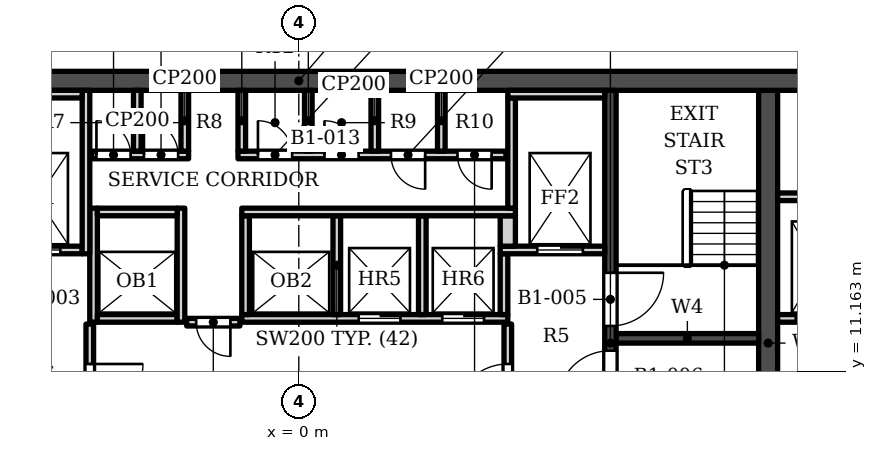
"""IFC4 building model, lengths in metres.
Left out: names, types, materials, properties, quantities, classifications, styles, units other than length and angle.
Written with IfcOpenShell. Run it as: python <this file> out.ifc"""

import sys

from ifc_helpers import new_model, si_unit, direction, frame, frame_2d, origin, place, context, subcontext, project, spatial, rectangle, extrude, element, fill, save


model = new_model("IFC4")
c1 = context("Model", 3, precision=1e-05, world=origin(), true_north=direction((0.0, 1.0)))
c2 = subcontext(c1, "Body", "Model", "MODEL_VIEW")
j1 = project(units=[si_unit("LENGTHUNIT", "METRE"), si_unit("PLANEANGLEUNIT", "RADIAN")], contexts=[c1])
p1 = place(None, origin())
s1 = spatial("IfcSite", under=j1, at=p1, CompositionType="ELEMENT")
p2 = place(p1, origin())
s2 = spatial("IfcBuilding", under=s1, at=p2, CompositionType="ELEMENT")
p3 = place(p2, frame((0.0, 0.0, -5.0)))
s3 = spatial("IfcBuildingStorey", under=s2, at=p3, CompositionType="ELEMENT", Elevation=-5.0)
p4 = place(p3, frame((-16.9, 18.802, 0.0), z_axis=(0.0, 0.0, 1.0), x_axis=(1.0, 0.0, 0.0)))
e1 = element("IfcWall", 1, at=p4, inside=s3, PredefinedType="SHEAR", context=c2, shape_type="SweptSolid", body=[
    extrude(rectangle(XDim=33.8, YDim=0.5, at=frame_2d((16.9, 0.0))), origin(), (0.0, 0.0, 1.0), 5.0),
])
p5 = place(p3, frame((12.35, 5.253, 0.0), z_axis=(0.0, 0.0, 1.0), x_axis=(0.0, 1.0, 0.0)))
e2 = element("IfcWall", 2, at=p5, inside=s3, PredefinedType="SHEAR", context=c2, shape_type="SweptSolid", body=[
    extrude(rectangle(XDim=13.3, YDim=0.5, at=frame_2d((6.65, 0.0))), origin(), (0.0, 0.0, 1.0), 5.0),
])
p6 = place(p3, frame((8.2, 5.253, 0.0), z_axis=(0.0, 0.0, 1.0), x_axis=(0.0, 1.0, 0.0)))
e3 = element("IfcWall", 3, at=p6, inside=s3, PredefinedType="SHEAR", context=c2, shape_type="SweptSolid", body=[
    extrude(rectangle(XDim=13.3, YDim=0.3, at=frame_2d((6.65, 0.0))), origin(), (0.0, 0.0, 1.0), 5.0),
])
p7 = place(p6, frame((7.1, 0.0, 0.0)))
e4 = element("IfcOpeningElement", 4, at=p7, cuts=e3, PredefinedType="OPENING", context=c2, shape_type="SweptSolid", body=[
    extrude(rectangle(XDim=1.4, YDim=2.1, at=frame_2d((0.7, 1.05))), frame((0.0, 0.16, 0.0), z_axis=(0.0, -1.0, 0.0), x_axis=(1.0, 0.0, 0.0)), (0.0, 0.0, 1.0), 0.32),
])
p8 = place(p6, frame((5.05, 0.0, 0.0)))
e5 = element("IfcOpeningElement", 5, at=p8, cuts=e3, PredefinedType="OPENING", context=c2, shape_type="SweptSolid", body=[
    extrude(rectangle(XDim=1.4, YDim=2.1, at=frame_2d((0.7, 1.05))), frame((0.0, 0.16, 0.0), z_axis=(0.0, -1.0, 0.0), x_axis=(1.0, 0.0, 0.0)), (0.0, 0.0, 1.0), 0.32),
])
p9 = place(p3, frame((8.35, 12.028, 0.0), z_axis=(0.0, 0.0, 1.0), x_axis=(1.0, 0.0, 0.0)))
e6 = element("IfcWall", 6, at=p9, inside=s3, PredefinedType="SHEAR", context=c2, shape_type="SweptSolid", body=[
    extrude(rectangle(XDim=3.75, YDim=0.25, at=frame_2d((1.875, 0.0))), origin(), (0.0, 0.0, 1.0), 5.0),
])
p10 = place(p3, frame((-5.5, 9.103, 0.0), z_axis=(0.0, 0.0, 1.0), x_axis=(0.0, 1.0, 0.0)))
e7 = element("IfcWall", 7, at=p10, inside=s3, PredefinedType="SOLIDWALL", context=c2, shape_type="SweptSolid", body=[
    extrude(rectangle(XDim=3.3, YDim=0.2, at=frame_2d((1.65, 0.0))), origin(), (0.0, 0.0, 1.0), 4.45),
])
p11 = place(p10, frame((0.85, 0.0, 0.0)))
e8 = element("IfcOpeningElement", 8, at=p11, cuts=e7, PredefinedType="OPENING", context=c2, shape_type="SweptSolid", body=[
    extrude(rectangle(XDim=1.4, YDim=2.1, at=frame_2d((0.7, 1.05))), frame((0.0, 0.11, 0.0), z_axis=(0.0, -1.0, 0.0), x_axis=(1.0, 0.0, 0.0)), (0.0, 0.0, 1.0), 0.22),
])
p12 = place(p3, frame((5.5, 9.103, 0.0), z_axis=(0.0, 0.0, 1.0), x_axis=(0.0, 1.0, 0.0)))
e9 = element("IfcWall", 9, at=p12, inside=s3, PredefinedType="SOLIDWALL", context=c2, shape_type="SweptSolid", body=[
    extrude(rectangle(XDim=3.3, YDim=0.2, at=frame_2d((1.65, 0.0))), origin(), (0.0, 0.0, 1.0), 4.45),
])
p13 = place(p12, frame((0.85, 0.0, 0.0)))
e10 = element("IfcOpeningElement", 10, at=p13, cuts=e9, PredefinedType="OPENING", context=c2, shape_type="SweptSolid", body=[
    extrude(rectangle(XDim=1.4, YDim=2.1, at=frame_2d((0.7, 1.05))), frame((0.0, 0.11, 0.0), z_axis=(0.0, -1.0, 0.0), x_axis=(1.0, 0.0, 0.0)), (0.0, 0.0, 1.0), 0.22),
])
p14 = place(p3, frame((-2.95, 12.453, 0.0), z_axis=(0.0, 0.0, 1.0), x_axis=(1.0, 0.0, 0.0)))
e11 = element("IfcWall", 11, at=p14, inside=s3, PredefinedType="SOLIDWALL", context=c2, shape_type="SweptSolid", body=[
    extrude(rectangle(XDim=1.4, YDim=0.2, at=frame_2d((0.7, 0.0))), origin(), (0.0, 0.0, 1.0), 4.45),
])
p15 = place(p14, frame((0.25, 0.0, 0.0)))
e12 = element("IfcOpeningElement", 12, at=p15, cuts=e11, PredefinedType="OPENING", context=c2, shape_type="SweptSolid", body=[
    extrude(rectangle(XDim=0.9, YDim=2.1, at=frame_2d((0.45, 1.05))), frame((0.0, 0.11, 0.0), z_axis=(0.0, -1.0, 0.0), x_axis=(1.0, 0.0, 0.0)), (0.0, 0.0, 1.0), 0.22),
])
p16 = place(p3, frame((-5.4, 12.453, 0.0), z_axis=(0.0, 0.0, 1.0), x_axis=(0.0, 1.0, 0.0)))
e13 = element("IfcWall", 13, at=p16, inside=s3, PredefinedType="SOLIDWALL", context=c2, shape_type="SweptSolid", body=[
    extrude(rectangle(XDim=3.0, YDim=0.2, at=frame_2d((1.5, 0.0))), origin(), (0.0, 0.0, 1.0), 4.45),
])
p17 = place(p3, frame((-5.3, 12.552, 0.0), z_axis=(0.0, 0.0, 1.0), x_axis=(1.0, 0.0, 0.0)))
e14 = element("IfcWall", 14, at=p17, inside=s3, PredefinedType="SOLIDWALL", context=c2, shape_type="SweptSolid", body=[
    extrude(rectangle(XDim=2.1, YDim=0.2, at=frame_2d((1.05, 0.0))), origin(), (0.0, 0.0, 1.0), 4.45),
])
p18 = place(p3, frame((-3.1, 12.453, 0.0), z_axis=(0.0, 0.0, 1.0), x_axis=(0.0, 1.0, 0.0)))
e15 = element("IfcWall", 15, at=p18, inside=s3, PredefinedType="SOLIDWALL", context=c2, shape_type="SweptSolid", body=[
    extrude(rectangle(XDim=3.0, YDim=0.2, at=frame_2d((1.5, 0.0))), origin(), (0.0, 0.0, 1.0), 4.45),
])
p19 = place(p3, frame((-1.5, 12.552, 0.0), z_axis=(0.0, 0.0, 1.0), x_axis=(1.0, 0.0, 0.0)))
e16 = element("IfcWall", 16, at=p19, inside=s3, PredefinedType="SOLIDWALL", context=c2, shape_type="SweptSolid", body=[
    extrude(rectangle(XDim=7.0, YDim=0.2, at=frame_2d((3.5, 0.0))), origin(), (0.0, 0.0, 1.0), 4.45),
])
p20 = place(p19, frame((3.075, 0.0, 0.0)))
e17 = element("IfcOpeningElement", 17, at=p20, cuts=e16, PredefinedType="OPENING", context=c2, shape_type="SweptSolid", body=[
    extrude(rectangle(XDim=1.1, YDim=2.1, at=frame_2d((0.55, 1.05))), frame((0.0, 0.11, 0.0), z_axis=(0.0, -1.0, 0.0), x_axis=(1.0, 0.0, 0.0)), (0.0, 0.0, 1.0), 0.22),
])
p21 = place(p19, frame((5.275, 0.0, 0.0)))
e18 = element("IfcOpeningElement", 18, at=p21, cuts=e16, PredefinedType="OPENING", context=c2, shape_type="SweptSolid", body=[
    extrude(rectangle(XDim=1.1, YDim=2.1, at=frame_2d((0.55, 1.05))), frame((0.0, 0.11, 0.0), z_axis=(0.0, -1.0, 0.0), x_axis=(1.0, 0.0, 0.0)), (0.0, 0.0, 1.0), 0.22),
])
p22 = place(p3, frame((12.6, 12.552, 0.0), z_axis=(0.0, 0.0, 1.0), x_axis=(1.0, 0.0, 0.0)))
e19 = element("IfcWall", 19, at=p22, inside=s3, PredefinedType="SOLIDWALL", context=c2, shape_type="SweptSolid", body=[
    extrude(rectangle(XDim=4.3, YDim=0.2, at=frame_2d((2.15, 0.0))), origin(), (0.0, 0.0, 1.0), 4.45),
])
p23 = place(p22, frame((0.475, 0.0, 0.0)))
e20 = element("IfcOpeningElement", 20, at=p23, cuts=e19, PredefinedType="OPENING", context=c2, shape_type="SweptSolid", body=[
    extrude(rectangle(XDim=1.2, YDim=2.1, at=frame_2d((0.6, 1.05))), frame((0.0, 0.11, 0.0), z_axis=(0.0, -1.0, 0.0), x_axis=(1.0, 0.0, 0.0)), (0.0, 0.0, 1.0), 0.22),
])
p24 = place(p22, frame((2.625, 0.0, 0.0)))
e21 = element("IfcOpeningElement", 21, at=p24, cuts=e19, PredefinedType="OPENING", context=c2, shape_type="SweptSolid", body=[
    extrude(rectangle(XDim=1.4, YDim=2.1, at=frame_2d((0.7, 1.05))), frame((0.0, 0.11, 0.0), z_axis=(0.0, -1.0, 0.0), x_axis=(1.0, 0.0, 0.0)), (0.0, 0.0, 1.0), 0.22),
])
for number, where, z_axis, x_axis in (
    (22, (-1.4, 12.653, 0.0), (0.0, 0.0, 1.0), (0.0, 1.0, 0.0)),
    (23, (1.0, 12.653, 0.0), (0.0, 0.0, 1.0), (0.0, 1.0, 0.0)),
    (24, (3.25, 12.653, 0.0), (0.0, 0.0, 1.0), (0.0, 1.0, 0.0)),
):
    element("IfcWall", number, at=place(p3, frame(where, z_axis=z_axis, x_axis=x_axis)), inside=s3, PredefinedType="SOLIDWALL", context=c2, shape_type="SweptSolid", body=[
        extrude(rectangle(XDim=2.6, YDim=0.2, at=frame_2d((1.3, 0.0))), origin(), (0.0, 0.0, 1.0), 4.45),
    ])
p25 = place(p3, frame((5.4, 12.653, 0.0), z_axis=(0.0, 0.0, 1.0), x_axis=(0.0, 1.0, 0.0)))
e25 = element("IfcWall", 25, at=p25, inside=s3, PredefinedType="SOLIDWALL", context=c2, shape_type="SweptSolid", body=[
    extrude(rectangle(XDim=1.6, YDim=0.2, at=frame_2d((0.8, 0.0))), origin(), (0.0, 0.0, 1.0), 4.45),
])
p26 = place(p3, frame((-8.05, 14.353, 0.0), z_axis=(0.0, 0.0, 1.0), x_axis=(1.0, 0.0, 0.0)))
e26 = element("IfcWall", 26, at=p26, inside=s3, PredefinedType="SOLIDWALL", context=c2, shape_type="SweptSolid", body=[
    extrude(rectangle(XDim=2.35, YDim=0.2, at=frame_2d((1.175, 0.0))), origin(), (0.0, 0.0, 1.0), 4.45),
])
p27 = place(p26, frame((0.575, 0.0, 0.0)))
e27 = element("IfcOpeningElement", 27, at=p27, cuts=e26, PredefinedType="OPENING", context=c2, shape_type="SweptSolid", body=[
    extrude(rectangle(XDim=1.2, YDim=2.1, at=frame_2d((0.6, 1.05))), frame((0.0, 0.11, 0.0), z_axis=(0.0, -1.0, 0.0), x_axis=(1.0, 0.0, 0.0)), (0.0, 0.0, 1.0), 0.22),
])
p28 = place(p3, frame((-5.6, 14.253, 0.0), z_axis=(0.0, 0.0, 1.0), x_axis=(0.0, 1.0, 0.0)))
e28 = element("IfcWall", 28, at=p28, inside=s3, PredefinedType="SOLIDWALL", context=c2, shape_type="SweptSolid", body=[
    extrude(rectangle(XDim=4.3, YDim=0.2, at=frame_2d((2.15, 0.0))), origin(), (0.0, 0.0, 1.0), 4.45),
])
p29 = place(p3, frame((5.3, 14.353, 0.0), z_axis=(0.0, 0.0, 1.0), x_axis=(1.0, 0.0, 0.0)))
e29 = element("IfcWall", 29, at=p29, inside=s3, PredefinedType="SOLIDWALL", context=c2, shape_type="SweptSolid", body=[
    extrude(rectangle(XDim=2.75, YDim=0.2, at=frame_2d((1.375, 0.0))), origin(), (0.0, 0.0, 1.0), 4.45),
])
p30 = place(p29, frame((0.975, 0.0, 0.0)))
e30 = element("IfcOpeningElement", 30, at=p30, cuts=e29, PredefinedType="OPENING", context=c2, shape_type="SweptSolid", body=[
    extrude(rectangle(XDim=1.2, YDim=2.1, at=frame_2d((0.6, 1.05))), frame((0.0, 0.11, 0.0), z_axis=(0.0, -1.0, 0.0), x_axis=(1.0, 0.0, 0.0)), (0.0, 0.0, 1.0), 0.22),
])
p31 = place(p3, frame((5.5, 14.453, 0.0), z_axis=(0.0, 0.0, 1.0), x_axis=(0.0, 1.0, 0.0)))
e31 = element("IfcWall", 31, at=p31, inside=s3, PredefinedType="SOLIDWALL", context=c2, shape_type="SweptSolid", body=[
    extrude(rectangle(XDim=0.8, YDim=0.4, at=frame_2d((0.4, 0.0))), origin(), (0.0, 0.0, 1.0), 4.45),
])
p32 = place(p3, frame((-5.3, 15.353, 0.0), z_axis=(0.0, 0.0, 1.0), x_axis=(1.0, 0.0, 0.0)))
e32 = element("IfcWall", 32, at=p32, inside=s3, PredefinedType="SOLIDWALL", context=c2, shape_type="SweptSolid", body=[
    extrude(rectangle(XDim=2.1, YDim=0.2, at=frame_2d((1.05, 0.0))), origin(), (0.0, 0.0, 1.0), 4.45),
])
p33 = place(p3, frame((-1.5, 15.353, 0.0), z_axis=(0.0, 0.0, 1.0), x_axis=(1.0, 0.0, 0.0)))
e33 = element("IfcWall", 33, at=p33, inside=s3, PredefinedType="SOLIDWALL", context=c2, shape_type="SweptSolid", body=[
    extrude(rectangle(XDim=7.2, YDim=0.2, at=frame_2d((3.6, 0.0))), origin(), (0.0, 0.0, 1.0), 4.45),
])
p34 = place(p3, frame((5.6, 15.453, 0.0), z_axis=(0.0, 0.0, 1.0), x_axis=(0.0, 1.0, 0.0)))
e34 = element("IfcWall", 34, at=p34, inside=s3, PredefinedType="SOLIDWALL", context=c2, shape_type="SweptSolid", body=[
    extrude(rectangle(XDim=2.9, YDim=0.2, at=frame_2d((1.45, 0.0))), origin(), (0.0, 0.0, 1.0), 4.45),
])
p35 = place(p3, frame((12.6, 15.753, 0.0), z_axis=(0.0, 0.0, 1.0), x_axis=(1.0, 0.0, 0.0)))
e35 = element("IfcWall", 35, at=p35, inside=s3, PredefinedType="SOLIDWALL", context=c2, shape_type="SweptSolid", body=[
    extrude(rectangle(XDim=4.3, YDim=0.2, at=frame_2d((2.15, 0.0))), origin(), (0.0, 0.0, 1.0), 4.45),
])
p36 = place(p3, frame((-5.45, 16.853, 0.0), z_axis=(0.0, 0.0, 1.0), x_axis=(1.0, 0.0, 0.0)))
e36 = element("IfcWall", 36, at=p36, inside=s3, PredefinedType="SOLIDWALL", context=c2, shape_type="SweptSolid", body=[
    extrude(rectangle(XDim=2.55, YDim=0.2, at=frame_2d((1.275, 0.0))), origin(), (0.0, 0.0, 1.0), 4.45),
])
p37 = place(p36, frame((0.125, 0.0, 0.0)))
e37 = element("IfcOpeningElement", 37, at=p37, cuts=e36, PredefinedType="OPENING", context=c2, shape_type="SweptSolid", body=[
    extrude(rectangle(XDim=0.9, YDim=2.1, at=frame_2d((0.45, 1.05))), frame((0.0, 0.11, 0.0), z_axis=(0.0, -1.0, 0.0), x_axis=(1.0, 0.0, 0.0)), (0.0, 0.0, 1.0), 0.22),
])
p38 = place(p36, frame((1.375, 0.0, 0.0)))
e38 = element("IfcOpeningElement", 38, at=p38, cuts=e36, PredefinedType="OPENING", context=c2, shape_type="SweptSolid", body=[
    extrude(rectangle(XDim=0.9, YDim=2.1, at=frame_2d((0.45, 1.05))), frame((0.0, 0.11, 0.0), z_axis=(0.0, -1.0, 0.0), x_axis=(1.0, 0.0, 0.0)), (0.0, 0.0, 1.0), 0.22),
])
p39 = place(p3, frame((-1.6, 16.853, 0.0), z_axis=(0.0, 0.0, 1.0), x_axis=(1.0, 0.0, 0.0)))
e39 = element("IfcWall", 39, at=p39, inside=s3, PredefinedType="SOLIDWALL", context=c2, shape_type="SweptSolid", body=[
    extrude(rectangle(XDim=7.05, YDim=0.2, at=frame_2d((3.525, 0.0))), origin(), (0.0, 0.0, 1.0), 4.45),
])
p40 = place(p39, frame((0.525, 0.0, 0.0)))
e40 = element("IfcOpeningElement", 40, at=p40, cuts=e39, PredefinedType="OPENING", context=c2, shape_type="SweptSolid", body=[
    extrude(rectangle(XDim=0.9, YDim=2.1, at=frame_2d((0.45, 1.05))), frame((0.0, 0.11, 0.0), z_axis=(0.0, -1.0, 0.0), x_axis=(1.0, 0.0, 0.0)), (0.0, 0.0, 1.0), 0.22),
])
p41 = place(p39, frame((2.275, 0.0, 0.0)))
e41 = element("IfcOpeningElement", 41, at=p41, cuts=e39, PredefinedType="OPENING", context=c2, shape_type="SweptSolid", body=[
    extrude(rectangle(XDim=0.9, YDim=2.1, at=frame_2d((0.45, 1.05))), frame((0.0, 0.11, 0.0), z_axis=(0.0, -1.0, 0.0), x_axis=(1.0, 0.0, 0.0)), (0.0, 0.0, 1.0), 0.22),
])
p42 = place(p39, frame((4.025, 0.0, 0.0)))
e42 = element("IfcOpeningElement", 42, at=p42, cuts=e39, PredefinedType="OPENING", context=c2, shape_type="SweptSolid", body=[
    extrude(rectangle(XDim=0.9, YDim=2.1, at=frame_2d((0.45, 1.05))), frame((0.0, 0.11, 0.0), z_axis=(0.0, -1.0, 0.0), x_axis=(1.0, 0.0, 0.0)), (0.0, 0.0, 1.0), 0.22),
])
p43 = place(p39, frame((5.775, 0.0, 0.0)))
e43 = element("IfcOpeningElement", 43, at=p43, cuts=e39, PredefinedType="OPENING", context=c2, shape_type="SweptSolid", body=[
    extrude(rectangle(XDim=0.9, YDim=2.1, at=frame_2d((0.45, 1.05))), frame((0.0, 0.11, 0.0), z_axis=(0.0, -1.0, 0.0), x_axis=(1.0, 0.0, 0.0)), (0.0, 0.0, 1.0), 0.22),
])
for number, where, z_axis, x_axis in (
    (44, (-4.25, 16.953, 0.0), (0.0, 0.0, 1.0), (0.0, 1.0, 0.0)),
    (45, (-3.0, 16.953, 0.0), (0.0, 0.0, 1.0), (0.0, 1.0, 0.0)),
    (46, (-1.5, 16.953, 0.0), (0.0, 0.0, 1.0), (0.0, 1.0, 0.0)),
    (47, (0.25, 16.953, 0.0), (0.0, 0.0, 1.0), (0.0, 1.0, 0.0)),
    (48, (2.0, 16.953, 0.0), (0.0, 0.0, 1.0), (0.0, 1.0, 0.0)),
    (49, (3.75, 16.953, 0.0), (0.0, 0.0, 1.0), (0.0, 1.0, 0.0)),
):
    element("IfcWall", number, at=place(p3, frame(where, z_axis=z_axis, x_axis=x_axis)), inside=s3, PredefinedType="PARTITIONING", context=c2, shape_type="SweptSolid", body=[
        extrude(rectangle(XDim=1.6, YDim=0.2, at=frame_2d((0.8, 0.0))), origin(), (0.0, 0.0, 1.0), 4.45),
    ])
p44 = place(p3, frame((-8.05, 18.453, 0.0), z_axis=(0.0, 0.0, 1.0), x_axis=(1.0, 0.0, 0.0)))
e50 = element("IfcWall", 50, at=p44, inside=s3, PredefinedType="SOLIDWALL", context=c2, shape_type="SweptSolid", body=[
    extrude(rectangle(XDim=2.35, YDim=0.2, at=frame_2d((1.175, 0.0))), origin(), (0.0, 0.0, 1.0), 4.45),
])
p45 = place(p3, frame((5.5, 18.453, 0.0), z_axis=(0.0, 0.0, 1.0), x_axis=(1.0, 0.0, 0.0)))
e51 = element("IfcWall", 51, at=p45, inside=s3, PredefinedType="SOLIDWALL", context=c2, shape_type="SweptSolid", body=[
    extrude(rectangle(XDim=2.55, YDim=0.2, at=frame_2d((1.275, 0.0))), origin(), (0.0, 0.0, 1.0), 4.45),
])
p46 = place(p20, origin())
e52 = element("IfcDoor", 52, at=p46, inside=s3, OperationType="DOUBLE_DOOR_SLIDING", PredefinedType="DOOR", context=c2, shape_type="SweptSolid", body=[
    extrude(rectangle(XDim=1.1, YDim=2.1, at=frame_2d((0.55, 1.05))), frame((0.0, 0.025, 0.0), z_axis=(0.0, -1.0, 0.0), x_axis=(1.0, 0.0, 0.0)), (0.0, 0.0, 1.0), 0.05),
])
fill(e17, e52)
p47 = place(p21, origin())
e53 = element("IfcDoor", 53, at=p47, inside=s3, OperationType="DOUBLE_DOOR_SLIDING", PredefinedType="DOOR", context=c2, shape_type="SweptSolid", body=[
    extrude(rectangle(XDim=1.1, YDim=2.1, at=frame_2d((0.55, 1.05))), frame((0.0, 0.025, 0.0), z_axis=(0.0, -1.0, 0.0), x_axis=(1.0, 0.0, 0.0)), (0.0, 0.0, 1.0), 0.05),
])
fill(e18, e53)
p48 = place(p27, origin())
e54 = element("IfcDoor", 54, at=p48, inside=s3, OperationType="DOUBLE_DOOR_SLIDING", PredefinedType="DOOR", context=c2, shape_type="SweptSolid", body=[
    extrude(rectangle(XDim=1.2, YDim=2.1, at=frame_2d((0.6, 1.05))), frame((0.0, 0.025, 0.0), z_axis=(0.0, -1.0, 0.0), x_axis=(1.0, 0.0, 0.0)), (0.0, 0.0, 1.0), 0.05),
])
fill(e27, e54)
p49 = place(p30, origin())
e55 = element("IfcDoor", 55, at=p49, inside=s3, OperationType="DOUBLE_DOOR_SLIDING", PredefinedType="DOOR", context=c2, shape_type="SweptSolid", body=[
    extrude(rectangle(XDim=1.2, YDim=2.1, at=frame_2d((0.6, 1.05))), frame((0.0, 0.025, 0.0), z_axis=(0.0, -1.0, 0.0), x_axis=(1.0, 0.0, 0.0)), (0.0, 0.0, 1.0), 0.05),
])
fill(e30, e55)
p50 = place(p23, origin())
e56 = element("IfcDoor", 56, at=p50, inside=s3, OperationType="DOUBLE_DOOR_SLIDING", PredefinedType="DOOR", context=c2, shape_type="SweptSolid", body=[
    extrude(rectangle(XDim=1.2, YDim=2.1, at=frame_2d((0.6, 1.05))), frame((0.0, 0.025, 0.0), z_axis=(0.0, -1.0, 0.0), x_axis=(1.0, 0.0, 0.0)), (0.0, 0.0, 1.0), 0.05),
])
fill(e20, e56)
p51 = place(p7, origin())
e57 = element("IfcDoor", 57, at=p51, inside=s3, OperationType="SINGLE_SWING_RIGHT", PredefinedType="DOOR", context=c2, shape_type="SweptSolid", body=[
    extrude(rectangle(XDim=1.4, YDim=2.1, at=frame_2d((0.7, 1.05))), frame((0.0, 0.025, 0.0), z_axis=(0.0, -1.0, 0.0), x_axis=(1.0, 0.0, 0.0)), (0.0, 0.0, 1.0), 0.05),
])
fill(e4, e57)
p52 = place(p8, origin())
e58 = element("IfcDoor", 58, at=p52, inside=s3, OperationType="SINGLE_SWING_LEFT", PredefinedType="DOOR", context=c2, shape_type="SweptSolid", body=[
    extrude(rectangle(XDim=1.4, YDim=2.1, at=frame_2d((0.7, 1.05))), frame((0.0, 0.025, 0.0), z_axis=(0.0, -1.0, 0.0), x_axis=(1.0, 0.0, 0.0)), (0.0, 0.0, 1.0), 0.05),
])
fill(e5, e58)
p53 = place(p15, origin())
e59 = element("IfcDoor", 59, at=p53, inside=s3, OperationType="SINGLE_SWING_RIGHT", PredefinedType="DOOR", context=c2, shape_type="SweptSolid", body=[
    extrude(rectangle(XDim=0.9, YDim=2.1, at=frame_2d((0.45, 1.05))), frame((0.0, 0.025, 0.0), z_axis=(0.0, -1.0, 0.0), x_axis=(1.0, 0.0, 0.0)), (0.0, 0.0, 1.0), 0.05),
])
fill(e12, e59)
p54 = place(p11, origin())
e60 = element("IfcDoor", 60, at=p54, inside=s3, OperationType="SINGLE_SWING_RIGHT", PredefinedType="DOOR", context=c2, shape_type="SweptSolid", body=[
    extrude(rectangle(XDim=1.4, YDim=2.1, at=frame_2d((0.7, 1.05))), frame((0.0, 0.025, 0.0), z_axis=(0.0, -1.0, 0.0), x_axis=(1.0, 0.0, 0.0)), (0.0, 0.0, 1.0), 0.05),
])
fill(e8, e60)
p55 = place(p13, origin())
e61 = element("IfcDoor", 61, at=p55, inside=s3, OperationType="SINGLE_SWING_LEFT", PredefinedType="DOOR", context=c2, shape_type="SweptSolid", body=[
    extrude(rectangle(XDim=1.4, YDim=2.1, at=frame_2d((0.7, 1.05))), frame((0.0, 0.025, 0.0), z_axis=(0.0, -1.0, 0.0), x_axis=(1.0, 0.0, 0.0)), (0.0, 0.0, 1.0), 0.05),
])
fill(e10, e61)
p56 = place(p37, origin())
e62 = element("IfcDoor", 62, at=p56, inside=s3, OperationType="SINGLE_SWING_LEFT", PredefinedType="DOOR", context=c2, shape_type="SweptSolid", body=[
    extrude(rectangle(XDim=0.9, YDim=2.1, at=frame_2d((0.45, 1.05))), frame((0.0, 0.025, 0.0), z_axis=(0.0, -1.0, 0.0), x_axis=(1.0, 0.0, 0.0)), (0.0, 0.0, 1.0), 0.05),
])
fill(e37, e62)
p57 = place(p38, origin())
e63 = element("IfcDoor", 63, at=p57, inside=s3, OperationType="SINGLE_SWING_LEFT", PredefinedType="DOOR", context=c2, shape_type="SweptSolid", body=[
    extrude(rectangle(XDim=0.9, YDim=2.1, at=frame_2d((0.45, 1.05))), frame((0.0, 0.025, 0.0), z_axis=(0.0, -1.0, 0.0), x_axis=(1.0, 0.0, 0.0)), (0.0, 0.0, 1.0), 0.05),
])
fill(e38, e63)
p58 = place(p40, origin())
e64 = element("IfcDoor", 64, at=p58, inside=s3, OperationType="SINGLE_SWING_LEFT", PredefinedType="DOOR", context=c2, shape_type="SweptSolid", body=[
    extrude(rectangle(XDim=0.9, YDim=2.1, at=frame_2d((0.45, 1.05))), frame((0.0, 0.025, 0.0), z_axis=(0.0, -1.0, 0.0), x_axis=(1.0, 0.0, 0.0)), (0.0, 0.0, 1.0), 0.05),
])
fill(e40, e64)
p59 = place(p41, origin())
e65 = element("IfcDoor", 65, at=p59, inside=s3, OperationType="SINGLE_SWING_LEFT", PredefinedType="DOOR", context=c2, shape_type="SweptSolid", body=[
    extrude(rectangle(XDim=0.9, YDim=2.1, at=frame_2d((0.45, 1.05))), frame((0.0, 0.025, 0.0), z_axis=(0.0, -1.0, 0.0), x_axis=(1.0, 0.0, 0.0)), (0.0, 0.0, 1.0), 0.05),
])
fill(e41, e65)
p60 = place(p42, origin())
e66 = element("IfcDoor", 66, at=p60, inside=s3, OperationType="SINGLE_SWING_RIGHT", PredefinedType="DOOR", context=c2, shape_type="SweptSolid", body=[
    extrude(rectangle(XDim=0.9, YDim=2.1, at=frame_2d((0.45, 1.05))), frame((0.0, 0.025, 0.0), z_axis=(0.0, -1.0, 0.0), x_axis=(1.0, 0.0, 0.0)), (0.0, 0.0, 1.0), 0.05),
])
fill(e42, e66)
p61 = place(p43, origin())
e67 = element("IfcDoor", 67, at=p61, inside=s3, OperationType="SINGLE_SWING_RIGHT", PredefinedType="DOOR", context=c2, shape_type="SweptSolid", body=[
    extrude(rectangle(XDim=0.9, YDim=2.1, at=frame_2d((0.45, 1.05))), frame((0.0, 0.025, 0.0), z_axis=(0.0, -1.0, 0.0), x_axis=(1.0, 0.0, 0.0)), (0.0, 0.0, 1.0), 0.05),
])
fill(e43, e67)
save(model, sys.argv[1])
